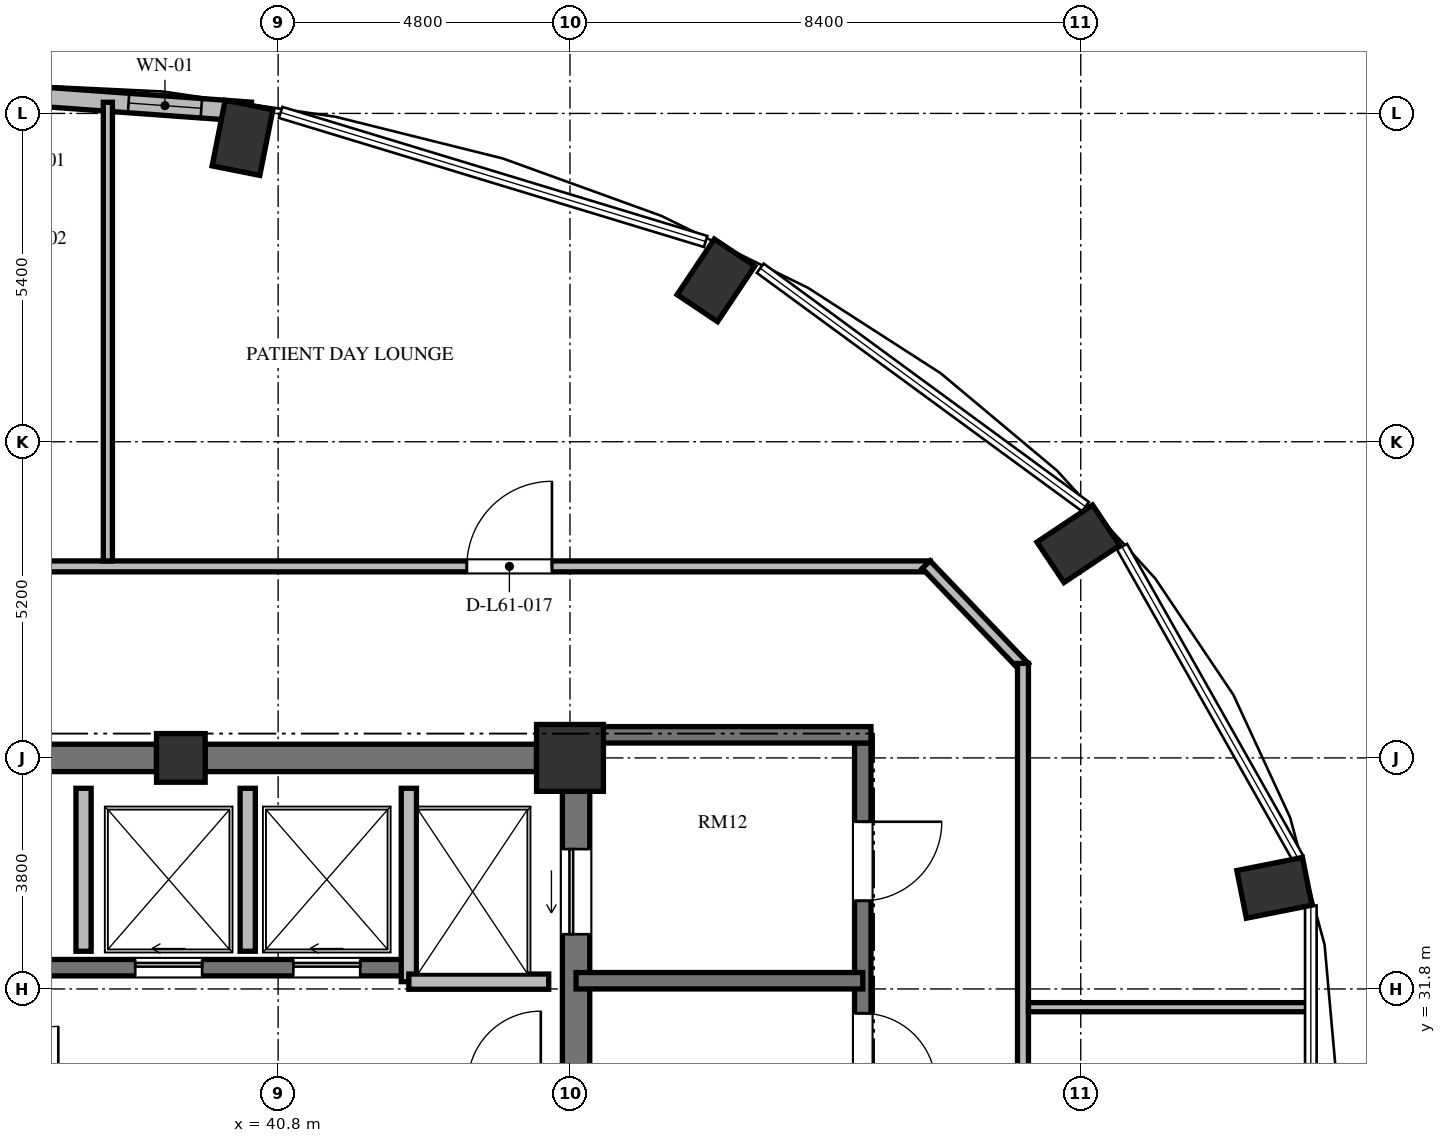
"""IFC4 building model, lengths in metres.
Left out: names, types, materials, properties, quantities, classifications, styles, units other than length and angle.
Written with IfcOpenShell. Run it as: python <this file> out.ifc"""

import sys

from ifc_helpers import new_model, si_unit, direction, frame, frame_2d, origin, origin_2d, place, context, subcontext, project, spatial, rectangle, extrude, element, fill, save


model = new_model("IFC4")
c1 = context("Model", 3, precision=1e-05, world=origin(), true_north=direction((0.0, 1.0)))
c2 = subcontext(c1, "Body", "Model", "MODEL_VIEW")
j1 = project(units=[si_unit("LENGTHUNIT", "METRE"), si_unit("PLANEANGLEUNIT", "RADIAN")], contexts=[c1])
p1 = place(None, origin())
s1 = spatial("IfcSite", under=j1, at=p1, CompositionType="ELEMENT")
p2 = place(p1, origin())
s2 = spatial("IfcBuilding", under=s1, at=p2, CompositionType="ELEMENT")
p3 = place(p2, frame((0.0, 0.0, 234.96)))
s3 = spatial("IfcBuildingStorey", under=s2, at=p3, CompositionType="ELEMENT", Elevation=234.96)
for number, where, z_axis, x_axis in (
    (1, (57.185, 33.463, 0.0), (0.0, 0.0, 1.0), (0.981, 0.195, 0.0)),
    (2, (53.96, 39.123, 0.0), (0.0, 0.0, 1.0), (0.831, 0.556, 0.0)),
    (3, (48.0, 43.454, 0.0), (0.0, 0.0, 1.0), (0.556, 0.831, 0.0)),
    (4, (40.214, 45.798, 0.0), (0.0, 0.0, 1.0), (0.195, 0.981, 0.0)),
):
    element("IfcColumn", number, at=place(p3, frame(where, z_axis=z_axis, x_axis=x_axis)), inside=s3, PredefinedType="COLUMN", context=c2, shape_type="SweptSolid", body=[
        extrude(rectangle(XDim=1.1, YDim=0.8, at=origin_2d()), origin(), (0.0, 0.0, 1.0), 3.648),
    ])
p4 = place(p3, frame((45.6, 35.6, 0.0), z_axis=(0.0, 0.0, 1.0), x_axis=(1.0, 0.0, 0.0)))
e5 = element("IfcColumn", 5, at=p4, inside=s3, PredefinedType="COLUMN", context=c2, shape_type="SweptSolid", body=[
    extrude(rectangle(XDim=1.1, YDim=1.1, at=origin_2d()), origin(), (0.0, 0.0, 1.0), 3.648),
])
p5 = place(p3, frame((39.2, 35.6, 0.0), z_axis=(0.0, 0.0, 1.0), x_axis=(1.0, 0.0, 0.0)))
e6 = element("IfcColumn", 6, at=p5, inside=s3, PredefinedType="COLUMN", context=c2, shape_type="SweptSolid", body=[
    extrude(rectangle(XDim=0.8, YDim=0.8, at=origin_2d()), origin(), (0.0, 0.0, 1.0), 3.648),
])
p6 = place(p3, frame((45.7, 20.95, 0.0), z_axis=(0.0, 0.0, 1.0), x_axis=(0.0, 1.0, 0.0)))
e7 = element("IfcWall", 7, at=p6, inside=s3, PredefinedType="SHEAR", context=c2, shape_type="SweptSolid", body=[
    extrude(rectangle(XDim=14.1, YDim=0.45, at=frame_2d((7.05, 0.0))), origin(), (0.0, 0.0, 1.0), 3.648),
])
p7 = place(p6, frame((11.75, 0.0, 0.0)))
e8 = element("IfcOpeningElement", 8, at=p7, cuts=e7, PredefinedType="OPENING", context=c2, shape_type="SweptSolid", body=[
    extrude(rectangle(XDim=1.4, YDim=2.3, at=frame_2d((0.7, 1.15))), frame((0.0, 0.235, 0.0), z_axis=(0.0, -1.0, 0.0), x_axis=(1.0, 0.0, 0.0)), (0.0, 0.0, 1.0), 0.47),
])
p8 = place(p6, frame((0.95, 0.0, 0.0)))
e9 = element("IfcOpeningElement", 9, at=p8, cuts=e7, PredefinedType="OPENING", context=c2, shape_type="SweptSolid", body=[
    extrude(rectangle(XDim=1.4, YDim=2.3, at=frame_2d((0.7, 1.15))), frame((0.0, 0.235, 0.0), z_axis=(0.0, -1.0, 0.0), x_axis=(1.0, 0.0, 0.0)), (0.0, 0.0, 1.0), 0.47),
])
p9 = place(p3, frame((33.2, 35.6, 0.0), z_axis=(0.0, 0.0, 1.0), x_axis=(1.0, 0.0, 0.0)))
e10 = element("IfcWall", 10, at=p9, inside=s3, PredefinedType="SHEAR", context=c2, shape_type="SweptSolid", body=[
    extrude(rectangle(XDim=5.6, YDim=0.45, at=frame_2d((2.8, 0.0))), origin(), (0.0, 0.0, 1.0), 3.648),
])
p10 = place(p3, frame((39.6, 35.6, 0.0), z_axis=(0.0, 0.0, 1.0), x_axis=(1.0, 0.0, 0.0)))
e11 = element("IfcWall", 11, at=p10, inside=s3, PredefinedType="SHEAR", context=c2, shape_type="SweptSolid", body=[
    extrude(rectangle(XDim=5.45, YDim=0.45, at=frame_2d((2.725, 0.0))), origin(), (0.0, 0.0, 1.0), 3.648),
])
p11 = place(p3, frame((40.35, 46.226, 0.0), z_axis=(0.0, 0.0, 1.0), x_axis=(-0.997409061056, 0.071938619141, 0.0)))
e12 = element("IfcWall", 12, at=p11, inside=s3, PredefinedType="SOLIDWALL", context=c2, shape_type="SweptSolid", body=[
    extrude(rectangle(XDim=4.541, YDim=0.32, at=frame_2d((2.271, 0.0))), origin(), (0.0, 0.0, 1.0), 3.448),
])
p12 = place(p11, frame((0.815, 0.0, 0.85)))
e13 = element("IfcOpeningElement", 13, at=p12, cuts=e12, PredefinedType="OPENING", context=c2, shape_type="SweptSolid", body=[
    extrude(rectangle(XDim=1.2, YDim=2.2, at=frame_2d((0.6, 1.1))), frame((0.0, 0.17, 0.0), z_axis=(0.0, -1.0, 0.0), x_axis=(1.0, 0.0, 0.0)), (0.0, 0.0, 1.0), 0.34),
])
p13 = place(p3, frame((26.55, 32.15, 0.0), z_axis=(0.0, 0.0, 1.0), x_axis=(1.0, 0.0, 0.0)))
e14 = element("IfcWall", 14, at=p13, inside=s3, PredefinedType="SHEAR", context=c2, shape_type="SweptSolid", body=[
    extrude(rectangle(XDim=16.4, YDim=0.27, at=frame_2d((8.2, 0.0))), origin(), (0.0, 0.0, 1.0), 3.648),
])
p14 = place(p13, frame((1.375, 0.0, 0.0)))
e15 = element("IfcOpeningElement", 15, at=p14, cuts=e14, PredefinedType="OPENING", context=c2, shape_type="SweptSolid", body=[
    extrude(rectangle(XDim=1.05, YDim=2.15, at=frame_2d((0.525, 1.075))), frame((0.0, 0.145, 0.0), z_axis=(0.0, -1.0, 0.0), x_axis=(1.0, 0.0, 0.0)), (0.0, 0.0, 1.0), 0.29),
])
p15 = place(p13, frame((4.975, 0.0, 0.0)))
e16 = element("IfcOpeningElement", 16, at=p15, cuts=e14, PredefinedType="OPENING", context=c2, shape_type="SweptSolid", body=[
    extrude(rectangle(XDim=1.05, YDim=2.15, at=frame_2d((0.525, 1.075))), frame((0.0, 0.145, 0.0), z_axis=(0.0, -1.0, 0.0), x_axis=(1.0, 0.0, 0.0)), (0.0, 0.0, 1.0), 0.29),
])
p16 = place(p13, frame((8.625, 0.0, 0.0)))
e17 = element("IfcOpeningElement", 17, at=p16, cuts=e14, PredefinedType="OPENING", context=c2, shape_type="SweptSolid", body=[
    extrude(rectangle(XDim=1.05, YDim=2.15, at=frame_2d((0.525, 1.075))), frame((0.0, 0.145, 0.0), z_axis=(0.0, -1.0, 0.0), x_axis=(1.0, 0.0, 0.0)), (0.0, 0.0, 1.0), 0.29),
])
p17 = place(p13, frame((11.9, 0.0, 0.0)))
e18 = element("IfcOpeningElement", 18, at=p17, cuts=e14, PredefinedType="OPENING", context=c2, shape_type="SweptSolid", body=[
    extrude(rectangle(XDim=1.1, YDim=2.2, at=frame_2d((0.55, 1.1))), frame((0.0, 0.145, 0.0), z_axis=(0.0, -1.0, 0.0), x_axis=(1.0, 0.0, 0.0)), (0.0, 0.0, 1.0), 0.29),
])
p18 = place(p13, frame((14.5, 0.0, 0.0)))
e19 = element("IfcOpeningElement", 19, at=p18, cuts=e14, PredefinedType="OPENING", context=c2, shape_type="SweptSolid", body=[
    extrude(rectangle(XDim=1.1, YDim=2.2, at=frame_2d((0.55, 1.1))), frame((0.0, 0.145, 0.0), z_axis=(0.0, -1.0, 0.0), x_axis=(1.0, 0.0, 0.0)), (0.0, 0.0, 1.0), 0.29),
])
p19 = place(p3, frame((42.95, 31.92, 0.0), z_axis=(0.0, 0.0, 1.0), x_axis=(0.0, 1.0, 0.0)))
e20 = element("IfcWall", 20, at=p19, inside=s3, PredefinedType="SOLIDWALL", context=c2, shape_type="SweptSolid", body=[
    extrude(rectangle(XDim=3.18, YDim=0.25, at=frame_2d((1.59, 0.0))), origin(), (0.0, 0.0, 1.0), 3.448),
])
p20 = place(p3, frame((42.95, 31.92, 0.0), z_axis=(0.0, 0.0, 1.0), x_axis=(1.0, 0.0, 0.0)))
e21 = element("IfcWall", 21, at=p20, inside=s3, PredefinedType="SOLIDWALL", context=c2, shape_type="SweptSolid", body=[
    extrude(rectangle(XDim=2.3, YDim=0.25, at=frame_2d((1.15, 0.0))), origin(), (0.0, 0.0, 1.0), 3.448),
])
for number, where, z_axis, x_axis in (
    (22, (37.6, 32.42, 0.0), (0.0, 0.0, 1.0), (0.0, 1.0, 0.0)),
    (23, (40.3, 32.42, 0.0), (0.0, 0.0, 1.0), (0.0, 1.0, 0.0)),
):
    element("IfcWall", number, at=place(p3, frame(where, z_axis=z_axis, x_axis=x_axis)), inside=s3, PredefinedType="SOLIDWALL", context=c2, shape_type="SweptSolid", body=[
        extrude(rectangle(XDim=2.68, YDim=0.25, at=frame_2d((1.34, 0.0))), origin(), (0.0, 0.0, 1.0), 3.448),
    ])
p21 = place(p3, frame((50.415, 35.845, 0.0), z_axis=(0.0, 0.0, 1.0), x_axis=(0.0, -1.0, 0.0)))
e24 = element("IfcWall", 24, at=p21, inside=s3, PredefinedType="SHEAR", context=c2, shape_type="SweptSolid", body=[
    extrude(rectangle(XDim=15.825, YDim=0.27, at=frame_2d((7.913, 0.0))), origin(), (0.0, 0.0, 1.0), 3.648),
])
p22 = place(p21, frame((4.445, 0.0, 0.0)))
e25 = element("IfcOpeningElement", 25, at=p22, cuts=e24, PredefinedType="OPENING", context=c2, shape_type="SweptSolid", body=[
    extrude(rectangle(XDim=1.2, YDim=2.15, at=frame_2d((0.6, 1.075))), frame((0.0, 0.145, 0.0), z_axis=(0.0, -1.0, 0.0), x_axis=(1.0, 0.0, 0.0)), (0.0, 0.0, 1.0), 0.29),
])
p23 = place(p21, frame((1.295, 0.0, 0.0)))
e26 = element("IfcOpeningElement", 26, at=p23, cuts=e24, PredefinedType="OPENING", context=c2, shape_type="SweptSolid", body=[
    extrude(rectangle(XDim=1.3, YDim=2.2, at=frame_2d((0.65, 1.1))), frame((0.0, 0.145, 0.0), z_axis=(0.0, -1.0, 0.0), x_axis=(1.0, 0.0, 0.0)), (0.0, 0.0, 1.0), 0.29),
])
p24 = place(p21, frame((13.095, 0.0, 0.0)))
e27 = element("IfcOpeningElement", 27, at=p24, cuts=e24, PredefinedType="OPENING", context=c2, shape_type="SweptSolid", body=[
    extrude(rectangle(XDim=1.3, YDim=2.2, at=frame_2d((0.65, 1.1))), frame((0.0, 0.145, 0.0), z_axis=(0.0, -1.0, 0.0), x_axis=(1.0, 0.0, 0.0)), (0.0, 0.0, 1.0), 0.29),
])
p25 = place(p3, frame((45.925, 35.98, 0.0), z_axis=(0.0, 0.0, 1.0), x_axis=(1.0, 0.0, 0.0)))
e28 = element("IfcWall", 28, at=p25, inside=s3, PredefinedType="SHEAR", context=c2, shape_type="SweptSolid", body=[
    extrude(rectangle(XDim=4.625, YDim=0.27, at=frame_2d((2.312, 0.0))), origin(), (0.0, 0.0, 1.0), 3.648),
])
p26 = place(p3, frame((45.7, 31.935, 0.0), z_axis=(0.0, 0.0, 1.0), x_axis=(1.0, 0.0, 0.0)))
e29 = element("IfcWall", 29, at=p26, inside=s3, PredefinedType="SHEAR", context=c2, shape_type="SweptSolid", body=[
    extrude(rectangle(XDim=4.715, YDim=0.27, at=frame_2d((2.357, 0.0))), origin(), (0.0, 0.0, 1.0), 3.648),
])
p27 = place(p3, frame((30.71, 38.75, 0.0), z_axis=(0.0, 0.0, 1.0), x_axis=(1.0, 0.0, 0.0)))
e30 = element("IfcWall", 30, at=p27, inside=s3, PredefinedType="PARTITIONING", context=c2, shape_type="SweptSolid", body=[
    extrude(rectangle(XDim=20.815, YDim=0.18, at=frame_2d((10.408, 0.0))), origin(), (0.0, 0.0, 1.0), 3.073),
])
p28 = place(p27, frame((13.194, 0.0, 0.0)))
e31 = element("IfcOpeningElement", 31, at=p28, cuts=e30, PredefinedType="OPENING", context=c2, shape_type="SweptSolid", body=[
    extrude(rectangle(XDim=1.4, YDim=2.2, at=frame_2d((0.7, 1.1))), frame((0.0, 0.1, 0.0), z_axis=(0.0, -1.0, 0.0), x_axis=(1.0, 0.0, 0.0)), (0.0, 0.0, 1.0), 0.2),
])
p29 = place(p27, frame((3.279, 0.0, 0.0)))
e32 = element("IfcOpeningElement", 32, at=p29, cuts=e30, PredefinedType="OPENING", context=c2, shape_type="SweptSolid", body=[
    extrude(rectangle(XDim=1.05, YDim=2.15, at=frame_2d((0.525, 1.075))), frame((0.0, 0.1, 0.0), z_axis=(0.0, -1.0, 0.0), x_axis=(1.0, 0.0, 0.0)), (0.0, 0.0, 1.0), 0.2),
])
p30 = place(p3, frame((51.458, 38.779, 0.0), z_axis=(0.0, 0.0, 1.0), x_axis=(0.691359830363, -0.722510612352, 0.0)))
e33 = element("IfcWall", 33, at=p30, inside=s3, PredefinedType="PARTITIONING", context=c2, shape_type="SweptSolid", body=[
    extrude(rectangle(XDim=2.343, YDim=0.18, at=frame_2d((1.172, 0.0))), origin(), (0.0, 0.0, 1.0), 3.033),
])
p31 = place(p3, frame((53.05, 37.155, 0.0), z_axis=(0.0, 0.0, 1.0), x_axis=(0.0, -1.0, 0.0)))
e34 = element("IfcWall", 34, at=p31, inside=s3, PredefinedType="PARTITIONING", context=c2, shape_type="SweptSolid", body=[
    extrude(rectangle(XDim=13.509, YDim=0.18, at=frame_2d((6.754, 0.0))), origin(), (0.0, 0.0, 1.0), 3.448),
])
p32 = place(p31, frame((8.629, 0.0, 0.0)))
e35 = element("IfcOpeningElement", 35, at=p32, cuts=e34, PredefinedType="OPENING", context=c2, shape_type="SweptSolid", body=[
    extrude(rectangle(XDim=1.05, YDim=2.15, at=frame_2d((0.525, 1.075))), frame((0.0, 0.1, 0.0), z_axis=(0.0, -1.0, 0.0), x_axis=(1.0, 0.0, 0.0)), (0.0, 0.0, 1.0), 0.2),
])
p33 = place(p3, frame((53.14, 31.5, 0.0), z_axis=(0.0, 0.0, 1.0), x_axis=(1.0, 0.0, 0.0)))
e36 = element("IfcWall", 36, at=p33, inside=s3, PredefinedType="PARTITIONING", context=c2, shape_type="SweptSolid", body=[
    extrude(rectangle(XDim=4.632, YDim=0.15, at=frame_2d((2.316, 0.0))), origin(), (0.0, 0.0, 1.0), 3.448),
])
p34 = place(p3, frame((38.0, 38.84, 0.0), z_axis=(0.0, 0.0, 1.0), x_axis=(0.0, 1.0, 0.0)))
e37 = element("IfcWall", 37, at=p34, inside=s3, PredefinedType="PARTITIONING", context=c2, shape_type="SweptSolid", body=[
    extrude(rectangle(XDim=7.543, YDim=0.15, at=frame_2d((3.771, 0.0))), origin(), (0.0, 0.0, 1.0), 3.448),
])
p35 = place(p12, origin())
e38 = element("IfcWindow", 38, at=p35, inside=s3, PartitioningType="SINGLE_PANEL", PredefinedType="WINDOW", context=c2, shape_type="SweptSolid", body=[
    extrude(rectangle(XDim=1.2, YDim=2.2, at=frame_2d((0.6, 1.1))), frame((0.0, 0.03, 0.0), z_axis=(0.0, -1.0, 0.0), x_axis=(1.0, 0.0, 0.0)), (0.0, 0.0, 1.0), 0.06),
])
fill(e13, e38)
p36 = place(p17, origin())
e39 = element("IfcDoor", 39, at=p36, inside=s3, OperationType="SLIDING_TO_LEFT", PredefinedType="DOOR", context=c2, shape_type="SweptSolid", body=[
    extrude(rectangle(XDim=1.1, YDim=2.2, at=frame_2d((0.55, 1.1))), frame((0.0, 0.025, 0.0), z_axis=(0.0, -1.0, 0.0), x_axis=(1.0, 0.0, 0.0)), (0.0, 0.0, 1.0), 0.05),
])
fill(e18, e39)
p37 = place(p18, origin())
e40 = element("IfcDoor", 40, at=p37, inside=s3, OperationType="SLIDING_TO_LEFT", PredefinedType="DOOR", context=c2, shape_type="SweptSolid", body=[
    extrude(rectangle(XDim=1.1, YDim=2.2, at=frame_2d((0.55, 1.1))), frame((0.0, 0.025, 0.0), z_axis=(0.0, -1.0, 0.0), x_axis=(1.0, 0.0, 0.0)), (0.0, 0.0, 1.0), 0.05),
])
fill(e19, e40)
p38 = place(p7, origin())
e41 = element("IfcDoor", 41, at=p38, inside=s3, OperationType="SLIDING_TO_LEFT", PredefinedType="DOOR", context=c2, shape_type="SweptSolid", body=[
    extrude(rectangle(XDim=1.4, YDim=2.3, at=frame_2d((0.7, 1.15))), frame((0.0, 0.025, 0.0), z_axis=(0.0, -1.0, 0.0), x_axis=(1.0, 0.0, 0.0)), (0.0, 0.0, 1.0), 0.05),
])
fill(e8, e41)
p39 = place(p22, origin())
e42 = element("IfcDoor", 42, at=p39, inside=s3, OperationType="SINGLE_SWING_RIGHT", PredefinedType="DOOR", context=c2, shape_type="SweptSolid", body=[
    extrude(rectangle(XDim=1.2, YDim=2.15, at=frame_2d((0.6, 1.075))), frame((0.0, 0.025, 0.0), z_axis=(0.0, -1.0, 0.0), x_axis=(1.0, 0.0, 0.0)), (0.0, 0.0, 1.0), 0.05),
])
fill(e25, e42)
p40 = place(p23, origin())
e43 = element("IfcDoor", 43, at=p40, inside=s3, OperationType="SINGLE_SWING_LEFT", PredefinedType="DOOR", context=c2, shape_type="SweptSolid", body=[
    extrude(rectangle(XDim=1.3, YDim=2.2, at=frame_2d((0.65, 1.1))), frame((0.0, 0.025, 0.0), z_axis=(0.0, -1.0, 0.0), x_axis=(1.0, 0.0, 0.0)), (0.0, 0.0, 1.0), 0.05),
])
fill(e26, e43)
p41 = place(p28, origin())
e44 = element("IfcDoor", 44, at=p41, inside=s3, OperationType="SINGLE_SWING_RIGHT", PredefinedType="DOOR", context=c2, shape_type="SweptSolid", body=[
    extrude(rectangle(XDim=1.4, YDim=2.2, at=frame_2d((0.7, 1.1))), frame((0.0, 0.025, 0.0), z_axis=(0.0, -1.0, 0.0), x_axis=(1.0, 0.0, 0.0)), (0.0, 0.0, 1.0), 0.05),
])
fill(e31, e44)
save(model, sys.argv[1])
